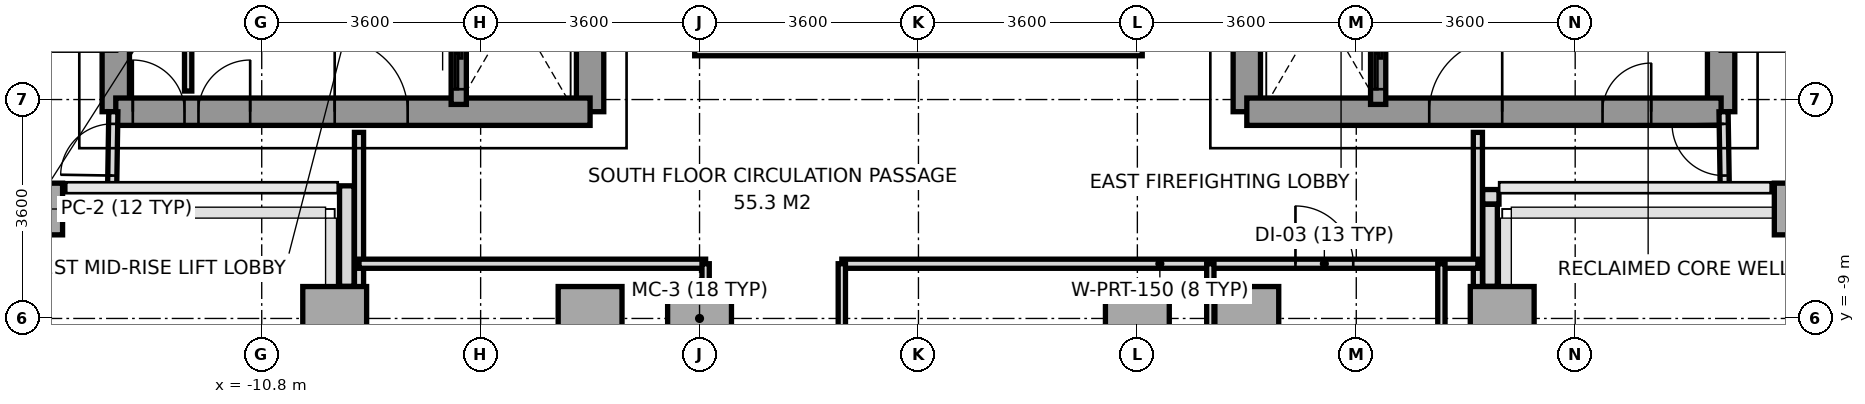
"""IFC4 building model, lengths in metres.
Left out: names, types, materials, properties, quantities, classifications, styles, units other than length and angle.
Written with IfcOpenShell. Run it as: python <this file> out.ifc"""

import sys

from ifc_helpers import new_model, si_unit, direction, frame, frame_2d, origin, origin_2d, place, context, subcontext, project, spatial, rectangle, extrude, source, transform, mapped, element, fill, save


model = new_model("IFC4")
c1 = context("Model", 3, precision=1e-05, world=origin(), true_north=direction((0.0, 1.0)))
c2 = subcontext(c1, "Body", "Model", "MODEL_VIEW")
j1 = project(units=[si_unit("LENGTHUNIT", "METRE"), si_unit("PLANEANGLEUNIT", "RADIAN")], contexts=[c1])
p1 = place(None, origin())
s1 = spatial("IfcSite", under=j1, at=p1, CompositionType="ELEMENT")
p2 = place(p1, origin())
s2 = spatial("IfcBuilding", under=s1, at=p2, CompositionType="ELEMENT")
p3 = place(p2, frame((0.0, 0.0, 121.0)))
s3 = spatial("IfcBuildingStorey", under=s2, at=p3, CompositionType="ELEMENT", Elevation=121.0)
m1 = source(origin(), c2, "Body", "SweptSolid", [
    extrude(rectangle(XDim=0.65, YDim=0.85, at=origin_2d()), origin(), (0.0, 0.0, 1.0), 3.2),
])
p4 = place(p3, frame((-14.4, -7.2, 0.0), z_axis=(0.0, 0.0, 1.0), x_axis=(1.0, 0.0, 0.0)))
e1 = element("IfcColumn", 1, at=p4, inside=s3, PredefinedType="COLUMN", context=c2, shape_type="MappedRepresentation", body=[
    mapped(m1, transform((0.0, 0.0, 0.0), x_axis=(1.0, 0.0, 0.0), y_axis=(0.0, 1.0, 0.0), z_axis=(0.0, 0.0, 1.0), scale=1.0)),
])
m2 = source(origin(), c2, "Body", "SweptSolid", [
    extrude(rectangle(XDim=1.05, YDim=1.05, at=origin_2d()), origin(), (0.0, 0.0, 1.0), 3.2),
])
for number, where, z_axis, x_axis in (
    (2, (-9.6, -9.0, 0.0), (0.0, 0.0, 1.0), (1.0, 0.0, 0.0)),
    (3, (-5.4, -9.0, 0.0), (0.0, 0.0, 1.0), (1.0, 0.0, 0.0)),
    (4, (-3.6, -9.0, 0.0), (0.0, 0.0, 1.0), (1.0, 0.0, 0.0)),
    (5, (3.6, -9.0, 0.0), (0.0, 0.0, 1.0), (1.0, 0.0, 0.0)),
    (6, (5.4, -9.0, 0.0), (0.0, 0.0, 1.0), (1.0, 0.0, 0.0)),
    (7, (9.6, -9.0, 0.0), (0.0, 0.0, 1.0), (1.0, 0.0, 0.0)),
):
    element("IfcColumn", number, at=place(p3, frame(where, z_axis=z_axis, x_axis=x_axis)), inside=s3, PredefinedType="COLUMN", context=c2, shape_type="MappedRepresentation", body=[
        mapped(m2, transform((0.0, 0.0, 0.0), x_axis=(1.0, 0.0, 0.0), y_axis=(0.0, 1.0, 0.0), z_axis=(0.0, 0.0, 1.0), scale=1.0)),
    ])
p5 = place(p3, frame((14.4, -7.2, 0.0), z_axis=(0.0, 0.0, 1.0), x_axis=(1.0, 0.0, 0.0)))
e8 = element("IfcColumn", 8, at=p5, inside=s3, PredefinedType="COLUMN", context=c2, shape_type="MappedRepresentation", body=[
    mapped(m1, transform((0.0, 0.0, 0.0), x_axis=(1.0, 0.0, 0.0), y_axis=(0.0, 1.0, 0.0), z_axis=(0.0, 0.0, 1.0), scale=1.0)),
])
p6 = place(p3, frame((9.547, -7.0, 0.0), z_axis=(0.0, 0.0, 1.0), x_axis=(-1.0, 0.0, 0.0)))
e9 = element("IfcWall", 9, at=p6, inside=s3, PredefinedType="PARAPET", context=c2, shape_type="SweptSolid", body=[
    extrude(rectangle(XDim=0.269, YDim=0.24, at=frame_2d((0.135, 0.0))), origin(), (0.0, 0.0, 1.0), 1.15),
])
p7 = place(p3, frame((9.4, -7.123, 0.0), z_axis=(0.0, 0.0, 1.0), x_axis=(0.0, -1.0, 0.0)))
e10 = element("IfcWall", 10, at=p7, inside=s3, PredefinedType="PARAPET", context=c2, shape_type="SweptSolid", body=[
    extrude(rectangle(XDim=1.349, YDim=0.24, at=frame_2d((0.674, 0.0))), origin(), (0.0, 0.0, 1.0), 1.15),
])
p8 = place(p3, frame((-9.4, -8.472, 0.0), z_axis=(0.0, 0.0, 1.0), x_axis=(0.0, 1.0, 0.0)))
e11 = element("IfcWall", 11, at=p8, inside=s3, PredefinedType="PARAPET", context=c2, shape_type="SweptSolid", body=[
    extrude(rectangle(XDim=1.653, YDim=0.24, at=frame_2d((0.827, 0.0))), origin(), (0.0, 0.0, 1.0), 1.15),
])
p9 = place(p3, frame((-13.2, -5.6, 0.0), z_axis=(0.0, 0.0, 1.0), x_axis=(0.0, 1.0, 0.0)))
e12 = element("IfcWall", 12, at=p9, inside=s3, PredefinedType="SHEAR", context=c2, shape_type="SweptSolid", body=[
    extrude(rectangle(XDim=11.2, YDim=0.45, at=frame_2d((5.6, 0.0))), origin(), (0.0, 0.0, 1.0), 3.2),
])
p10 = place(p3, frame((-5.4, -5.6, 0.0), z_axis=(0.0, 0.0, 1.0), x_axis=(0.0, 1.0, 0.0)))
e13 = element("IfcWall", 13, at=p10, inside=s3, PredefinedType="SHEAR", context=c2, shape_type="SweptSolid", body=[
    extrude(rectangle(XDim=12.5, YDim=0.45, at=frame_2d((6.25, 0.0))), origin(), (0.0, 0.0, 1.0), 3.2),
])
p11 = place(p10, frame((4.55, 0.0, 0.0)))
e14 = element("IfcOpeningElement", 14, at=p11, cuts=e13, PredefinedType="OPENING", context=c2, shape_type="SweptSolid", body=[
    extrude(rectangle(XDim=1.2, YDim=2.2, at=frame_2d((0.6, 1.1))), frame((0.0, 0.235, 0.0), z_axis=(0.0, -1.0, 0.0), x_axis=(1.0, 0.0, 0.0)), (0.0, 0.0, 1.0), 0.47),
])
p12 = place(p10, frame((6.86, 0.0, 0.0)))
e15 = element("IfcOpeningElement", 15, at=p12, cuts=e13, PredefinedType="OPENING", context=c2, shape_type="SweptSolid", body=[
    extrude(rectangle(XDim=0.8, YDim=2.1, at=frame_2d((0.4, 1.05))), frame((0.0, 0.235, 0.0), z_axis=(0.0, -1.0, 0.0), x_axis=(1.0, 0.0, 0.0)), (0.0, 0.0, 1.0), 0.47),
])
p13 = place(p3, frame((-13.2, -5.6, 0.0), z_axis=(0.0, 0.0, 1.0), x_axis=(1.0, 0.0, 0.0)))
e16 = element("IfcWall", 16, at=p13, inside=s3, PredefinedType="SHEAR", context=c2, shape_type="SweptSolid", body=[
    extrude(rectangle(XDim=7.8, YDim=0.45, at=frame_2d((3.9, 0.0))), origin(), (0.0, 0.0, 1.0), 3.2),
])
p14 = place(p13, frame((3.6, 0.0, 0.0)))
e17 = element("IfcOpeningElement", 17, at=p14, cuts=e16, PredefinedType="OPENING", context=c2, shape_type="SweptSolid", body=[
    extrude(rectangle(XDim=1.2, YDim=2.2, at=frame_2d((0.6, 1.1))), frame((0.0, 0.235, 0.0), z_axis=(0.0, -1.0, 0.0), x_axis=(1.0, 0.0, 0.0)), (0.0, 0.0, 1.0), 0.47),
])
p15 = place(p13, frame((0.28, 0.0, 0.0)))
e18 = element("IfcOpeningElement", 18, at=p15, cuts=e16, PredefinedType="OPENING", context=c2, shape_type="SweptSolid", body=[
    extrude(rectangle(XDim=0.85, YDim=2.1, at=frame_2d((0.425, 1.05))), frame((0.0, 0.235, 0.0), z_axis=(0.0, -1.0, 0.0), x_axis=(1.0, 0.0, 0.0)), (0.0, 0.0, 1.0), 0.47),
])
p16 = place(p13, frame((1.36, 0.0, 0.0)))
e19 = element("IfcOpeningElement", 19, at=p16, cuts=e16, PredefinedType="OPENING", context=c2, shape_type="SweptSolid", body=[
    extrude(rectangle(XDim=0.85, YDim=2.1, at=frame_2d((0.425, 1.05))), frame((0.0, 0.235, 0.0), z_axis=(0.0, -1.0, 0.0), x_axis=(1.0, 0.0, 0.0)), (0.0, 0.0, 1.0), 0.47),
])
p17 = place(p3, frame((13.2, -5.6, 0.0), z_axis=(0.0, 0.0, 1.0), x_axis=(0.0, 1.0, 0.0)))
e20 = element("IfcWall", 20, at=p17, inside=s3, PredefinedType="SHEAR", context=c2, shape_type="SweptSolid", body=[
    extrude(rectangle(XDim=11.2, YDim=0.45, at=frame_2d((5.6, 0.0))), origin(), (0.0, 0.0, 1.0), 3.2),
])
p18 = place(p3, frame((5.4, -5.6, 0.0), z_axis=(0.0, 0.0, 1.0), x_axis=(0.0, 1.0, 0.0)))
e21 = element("IfcWall", 21, at=p18, inside=s3, PredefinedType="SHEAR", context=c2, shape_type="SweptSolid", body=[
    extrude(rectangle(XDim=12.5, YDim=0.45, at=frame_2d((6.25, 0.0))), origin(), (0.0, 0.0, 1.0), 3.2),
])
p19 = place(p18, frame((4.55, 0.0, 0.0)))
e22 = element("IfcOpeningElement", 22, at=p19, cuts=e21, PredefinedType="OPENING", context=c2, shape_type="SweptSolid", body=[
    extrude(rectangle(XDim=1.2, YDim=2.2, at=frame_2d((0.6, 1.1))), frame((0.0, 0.235, 0.0), z_axis=(0.0, -1.0, 0.0), x_axis=(1.0, 0.0, 0.0)), (0.0, 0.0, 1.0), 0.47),
])
p20 = place(p18, frame((6.86, 0.0, 0.0)))
e23 = element("IfcOpeningElement", 23, at=p20, cuts=e21, PredefinedType="OPENING", context=c2, shape_type="SweptSolid", body=[
    extrude(rectangle(XDim=0.8, YDim=2.1, at=frame_2d((0.4, 1.05))), frame((0.0, 0.235, 0.0), z_axis=(0.0, -1.0, 0.0), x_axis=(1.0, 0.0, 0.0)), (0.0, 0.0, 1.0), 0.47),
])
p21 = place(p18, frame((7.88, 0.0, 0.0)))
e24 = element("IfcOpeningElement", 24, at=p21, cuts=e21, PredefinedType="OPENING", context=c2, shape_type="SweptSolid", body=[
    extrude(rectangle(XDim=0.8, YDim=2.1, at=frame_2d((0.4, 1.05))), frame((0.0, 0.235, 0.0), z_axis=(0.0, -1.0, 0.0), x_axis=(1.0, 0.0, 0.0)), (0.0, 0.0, 1.0), 0.47),
])
p22 = place(p3, frame((5.4, -5.6, 0.0), z_axis=(0.0, 0.0, 1.0), x_axis=(1.0, 0.0, 0.0)))
e25 = element("IfcWall", 25, at=p22, inside=s3, PredefinedType="SHEAR", context=c2, shape_type="SweptSolid", body=[
    extrude(rectangle(XDim=7.8, YDim=0.45, at=frame_2d((3.9, 0.0))), origin(), (0.0, 0.0, 1.0), 3.2),
])
p23 = place(p22, frame((3.0, 0.0, 0.0)))
e26 = element("IfcOpeningElement", 26, at=p23, cuts=e25, PredefinedType="OPENING", context=c2, shape_type="SweptSolid", body=[
    extrude(rectangle(XDim=1.2, YDim=2.2, at=frame_2d((0.6, 1.1))), frame((0.0, 0.235, 0.0), z_axis=(0.0, -1.0, 0.0), x_axis=(1.0, 0.0, 0.0)), (0.0, 0.0, 1.0), 0.47),
])
p24 = place(p22, frame((5.85, 0.0, 0.0)))
e27 = element("IfcOpeningElement", 27, at=p24, cuts=e25, PredefinedType="OPENING", context=c2, shape_type="SweptSolid", body=[
    extrude(rectangle(XDim=0.8, YDim=2.1, at=frame_2d((0.4, 1.05))), frame((0.0, 0.235, 0.0), z_axis=(0.0, -1.0, 0.0), x_axis=(1.0, 0.0, 0.0)), (0.0, 0.0, 1.0), 0.47),
])
p25 = place(p3, frame((-7.56, -5.48, 0.0), z_axis=(0.0, 0.0, 1.0), x_axis=(0.0, 1.0, 0.0)))
e28 = element("IfcWall", 28, at=p25, inside=s3, PredefinedType="SOLIDWALL", context=c2, shape_type="SweptSolid", body=[
    extrude(rectangle(XDim=1.6, YDim=0.25, at=frame_2d((0.8, 0.0))), origin(), (0.0, 0.0, 1.0), 3.2),
])
p26 = place(p25, frame((0.25, 0.0, 0.0)))
e29 = element("IfcOpeningElement", 29, at=p26, cuts=e28, PredefinedType="OPENING", context=c2, shape_type="SweptSolid", body=[
    extrude(rectangle(XDim=1.1, YDim=2.2, at=frame_2d((0.55, 1.1))), frame((0.0, 0.135, 0.0), z_axis=(0.0, -1.0, 0.0), x_axis=(1.0, 0.0, 0.0)), (0.0, 0.0, 1.0), 0.27),
])
p27 = place(p3, frame((7.56, -5.48, 0.0), z_axis=(0.0, 0.0, 1.0), x_axis=(0.0, 1.0, 0.0)))
e30 = element("IfcWall", 30, at=p27, inside=s3, PredefinedType="SOLIDWALL", context=c2, shape_type="SweptSolid", body=[
    extrude(rectangle(XDim=1.6, YDim=0.25, at=frame_2d((0.8, 0.0))), origin(), (0.0, 0.0, 1.0), 3.2),
])
p28 = place(p27, frame((0.25, 0.0, 0.0)))
e31 = element("IfcOpeningElement", 31, at=p28, cuts=e30, PredefinedType="OPENING", context=c2, shape_type="SweptSolid", body=[
    extrude(rectangle(XDim=1.1, YDim=2.2, at=frame_2d((0.55, 1.1))), frame((0.0, 0.135, 0.0), z_axis=(0.0, -1.0, 0.0), x_axis=(1.0, 0.0, 0.0)), (0.0, 0.0, 1.0), 0.27),
])
p29 = place(p3, frame((-12.01, -5.26, 0.0), z_axis=(0.0, 0.0, 1.0), x_axis=(0.0, 1.0, 0.0)))
e32 = element("IfcWall", 32, at=p29, inside=s3, PredefinedType="PARTITIONING", context=c2, shape_type="SweptSolid", body=[
    extrude(rectangle(XDim=2.94, YDim=0.12, at=frame_2d((1.47, 0.0))), origin(), (0.0, 0.0, 1.0), 3.2),
])
for number, where, z_axis, x_axis in (
    (33, (-9.2, -15.68, 0.0), (0.0, 0.0, 1.0), (0.0, 1.0, 0.0)),
    (34, (9.2, -15.68, 0.0), (0.0, 0.0, 1.0), (0.0, 1.0, 0.0)),
):
    element("IfcWall", number, at=place(p3, frame(where, z_axis=z_axis, x_axis=x_axis)), inside=s3, PredefinedType="PARTITIONING", context=c2, shape_type="SweptSolid", body=[
        extrude(rectangle(XDim=9.74, YDim=0.15, at=frame_2d((4.87, 0.0))), origin(), (0.0, 0.0, 1.0), 2.7),
    ])
p30 = place(p3, frame((-9.2, -8.1, 0.0), z_axis=(0.0, 0.0, 1.0), x_axis=(1.0, 0.0, 0.0)))
e35 = element("IfcWall", 35, at=p30, inside=s3, PredefinedType="PARTITIONING", context=c2, shape_type="SweptSolid", body=[
    extrude(rectangle(XDim=5.7, YDim=0.15, at=frame_2d((2.85, 0.0))), origin(), (0.0, 0.0, 1.0), 2.75),
])
p31 = place(p3, frame((-1.26, -8.1, 0.0), z_axis=(0.0, 0.0, 1.0), x_axis=(1.0, 0.0, 0.0)))
e36 = element("IfcWall", 36, at=p31, inside=s3, PredefinedType="PARTITIONING", context=c2, shape_type="SweptSolid", body=[
    extrude(rectangle(XDim=10.46, YDim=0.15, at=frame_2d((5.23, 0.0))), origin(), (0.0, 0.0, 1.0), 2.75),
])
p32 = place(p31, frame((7.46, 0.0, 0.0)))
e37 = element("IfcOpeningElement", 37, at=p32, cuts=e36, PredefinedType="OPENING", context=c2, shape_type="SweptSolid", body=[
    extrude(rectangle(XDim=0.95, YDim=2.15, at=frame_2d((0.475, 1.075))), frame((0.0, 0.085, 0.0), z_axis=(0.0, -1.0, 0.0), x_axis=(1.0, 0.0, 0.0)), (0.0, 0.0, 1.0), 0.17),
])
p33 = place(p3, frame((-3.5, -16.05, 0.0), z_axis=(0.0, 0.0, 1.0), x_axis=(0.0, 1.0, 0.0)))
e38 = element("IfcWall", 38, at=p33, inside=s3, PredefinedType="PARTITIONING", context=c2, shape_type="SweptSolid", body=[
    extrude(rectangle(XDim=7.95, YDim=0.12, at=frame_2d((3.975, 0.0))), origin(), (0.0, 0.0, 1.0), 2.7),
])
p34 = place(p33, frame((1.2, 0.0, 0.0)))
e39 = element("IfcOpeningElement", 39, at=p34, cuts=e38, PredefinedType="OPENING", context=c2, shape_type="SweptSolid", body=[
    extrude(rectangle(XDim=0.95, YDim=2.15, at=frame_2d((0.475, 1.075))), frame((0.0, 0.07, 0.0), z_axis=(0.0, -1.0, 0.0), x_axis=(1.0, 0.0, 0.0)), (0.0, 0.0, 1.0), 0.14),
])
p35 = place(p3, frame((-1.26, -16.05, 0.0), z_axis=(0.0, 0.0, 1.0), x_axis=(0.0, 1.0, 0.0)))
e40 = element("IfcWall", 40, at=p35, inside=s3, PredefinedType="PARTITIONING", context=c2, shape_type="SweptSolid", body=[
    extrude(rectangle(XDim=7.95, YDim=0.12, at=frame_2d((3.975, 0.0))), origin(), (0.0, 0.0, 1.0), 2.7),
])
p36 = place(p35, frame((1.95, 0.0, 0.0)))
e41 = element("IfcOpeningElement", 41, at=p36, cuts=e40, PredefinedType="OPENING", context=c2, shape_type="SweptSolid", body=[
    extrude(rectangle(XDim=0.95, YDim=2.15, at=frame_2d((0.475, 1.075))), frame((0.0, 0.07, 0.0), z_axis=(0.0, -1.0, 0.0), x_axis=(1.0, 0.0, 0.0)), (0.0, 0.0, 1.0), 0.14),
])
p37 = place(p3, frame((4.8, -11.5, 0.0), z_axis=(0.0, 0.0, 1.0), x_axis=(0.0, 1.0, 0.0)))
e42 = element("IfcWall", 42, at=p37, inside=s3, PredefinedType="PARTITIONING", context=c2, shape_type="SweptSolid", body=[
    extrude(rectangle(XDim=3.4, YDim=0.12, at=frame_2d((1.7, 0.0))), origin(), (0.0, 0.0, 1.0), 3.2),
])
p38 = place(p3, frame((8.6, -11.5, 0.0), z_axis=(0.0, 0.0, 1.0), x_axis=(0.0, 1.0, 0.0)))
e43 = element("IfcWall", 43, at=p38, inside=s3, PredefinedType="PARTITIONING", context=c2, shape_type="SweptSolid", body=[
    extrude(rectangle(XDim=3.4, YDim=0.12, at=frame_2d((1.7, 0.0))), origin(), (0.0, 0.0, 1.0), 2.7),
])
p39 = place(p3, frame((-13.26, -6.85, 0.0), z_axis=(0.0, 0.0, 1.0), x_axis=(0.016013571389, 0.999871774545, 0.0)))
e44 = element("IfcWall", 44, at=p39, inside=s3, PredefinedType="PARTITIONING", context=c2, shape_type="SweptSolid", body=[
    extrude(rectangle(XDim=1.25, YDim=0.15, at=frame_2d((0.625, 0.0))), origin(), (0.0, 0.0, 1.0), 3.2),
])
p40 = place(p39, frame((0.2, 0.0, 0.0)))
e45 = element("IfcOpeningElement", 45, at=p40, cuts=e44, PredefinedType="OPENING", context=c2, shape_type="SweptSolid", body=[
    extrude(rectangle(XDim=0.85, YDim=2.1, at=frame_2d((0.425, 1.05))), frame((0.0, 0.085, 0.0), z_axis=(0.0, -1.0, 0.0), x_axis=(1.0, 0.0, 0.0)), (0.0, 0.0, 1.0), 0.17),
])
p41 = place(p3, frame((13.26, -6.85, 0.0), z_axis=(0.0, 0.0, 1.0), x_axis=(-0.016013571389, 0.999871774545, 0.0)))
e46 = element("IfcWall", 46, at=p41, inside=s3, PredefinedType="PARTITIONING", context=c2, shape_type="SweptSolid", body=[
    extrude(rectangle(XDim=1.25, YDim=0.15, at=frame_2d((0.625, 0.0))), origin(), (0.0, 0.0, 1.0), 3.2),
])
p42 = place(p41, frame((0.2, 0.0, 0.0)))
e47 = element("IfcOpeningElement", 47, at=p42, cuts=e46, PredefinedType="OPENING", context=c2, shape_type="SweptSolid", body=[
    extrude(rectangle(XDim=0.85, YDim=2.1, at=frame_2d((0.425, 1.05))), frame((0.0, 0.085, 0.0), z_axis=(0.0, -1.0, 0.0), x_axis=(1.0, 0.0, 0.0)), (0.0, 0.0, 1.0), 0.17),
])
p43 = place(p3, frame((-3.68, -4.56, 0.0), z_axis=(0.0, 0.0, 1.0), x_axis=(1.0, 0.0, 0.0)))
e48 = element("IfcWall", 48, at=p43, inside=s3, PredefinedType="PARAPET", context=c2, shape_type="SweptSolid", body=[
    extrude(rectangle(XDim=7.36, YDim=0.24, at=frame_2d((3.68, 0.0))), origin(), (0.0, 0.0, 1.0), 1.15),
])
m3 = source(origin(), c2, "Body", "SweptSolid", [
    extrude(rectangle(XDim=1.2, YDim=2.2, at=frame_2d((0.6, 1.1))), frame((0.0, 0.025, 0.0), z_axis=(0.0, -1.0, 0.0), x_axis=(1.0, 0.0, 0.0)), (0.0, 0.0, 1.0), 0.05),
])
p44 = place(p14, origin())
e49 = element("IfcDoor", 49, at=p44, inside=s3, OperationType="SINGLE_SWING_LEFT", PredefinedType="DOOR", context=c2, shape_type="MappedRepresentation", body=[
    mapped(m3, transform((0.0, 0.0, 0.0), x_axis=(1.0, 0.0, 0.0), y_axis=(0.0, 1.0, 0.0), z_axis=(0.0, 0.0, 1.0), scale=1.0)),
])
fill(e17, e49)
p45 = place(p23, origin())
e50 = element("IfcDoor", 50, at=p45, inside=s3, OperationType="SINGLE_SWING_RIGHT", PredefinedType="DOOR", context=c2, shape_type="MappedRepresentation", body=[
    mapped(m3, transform((0.0, 0.0, 0.0), x_axis=(1.0, 0.0, 0.0), y_axis=(0.0, 1.0, 0.0), z_axis=(0.0, 0.0, 1.0), scale=1.0)),
])
fill(e26, e50)
m4 = source(origin(), c2, "Body", "SweptSolid", [
    extrude(rectangle(XDim=0.85, YDim=2.1, at=frame_2d((0.425, 1.05))), frame((0.0, 0.025, 0.0), z_axis=(0.0, -1.0, 0.0), x_axis=(1.0, 0.0, 0.0)), (0.0, 0.0, 1.0), 0.05),
])
p46 = place(p15, origin())
e51 = element("IfcDoor", 51, at=p46, inside=s3, OperationType="SINGLE_SWING_LEFT", PredefinedType="DOOR", context=c2, shape_type="MappedRepresentation", body=[
    mapped(m4, transform((0.0, 0.0, 0.0), x_axis=(1.0, 0.0, 0.0), y_axis=(0.0, 1.0, 0.0), z_axis=(0.0, 0.0, 1.0), scale=1.0)),
])
fill(e18, e51)
p47 = place(p16, origin())
e52 = element("IfcDoor", 52, at=p47, inside=s3, OperationType="SINGLE_SWING_RIGHT", PredefinedType="DOOR", context=c2, shape_type="MappedRepresentation", body=[
    mapped(m4, transform((0.0, 0.0, 0.0), x_axis=(1.0, 0.0, 0.0), y_axis=(0.0, 1.0, 0.0), z_axis=(0.0, 0.0, 1.0), scale=1.0)),
])
fill(e19, e52)
m5 = source(origin(), c2, "Body", "SweptSolid", [
    extrude(rectangle(XDim=0.8, YDim=2.1, at=frame_2d((0.4, 1.05))), frame((0.0, 0.025, 0.0), z_axis=(0.0, -1.0, 0.0), x_axis=(1.0, 0.0, 0.0)), (0.0, 0.0, 1.0), 0.05),
])
p48 = place(p24, origin())
e53 = element("IfcDoor", 53, at=p48, inside=s3, OperationType="SINGLE_SWING_RIGHT", PredefinedType="DOOR", context=c2, shape_type="MappedRepresentation", body=[
    mapped(m5, transform((0.0, 0.0, 0.0), x_axis=(1.0, 0.0, 0.0), y_axis=(0.0, 1.0, 0.0), z_axis=(0.0, 0.0, 1.0), scale=1.0)),
])
fill(e27, e53)
m6 = source(origin(), c2, "Body", "SweptSolid", [
    extrude(rectangle(XDim=1.1, YDim=2.2, at=frame_2d((0.55, 1.1))), frame((0.0, 0.025, 0.0), z_axis=(0.0, -1.0, 0.0), x_axis=(1.0, 0.0, 0.0)), (0.0, 0.0, 1.0), 0.05),
])
p49 = place(p26, origin())
e54 = element("IfcDoor", 54, at=p49, inside=s3, OperationType="SLIDING_TO_LEFT", PredefinedType="DOOR", context=c2, shape_type="MappedRepresentation", body=[
    mapped(m6, transform((0.0, 0.0, 0.0), x_axis=(1.0, 0.0, 0.0), y_axis=(0.0, 1.0, 0.0), z_axis=(0.0, 0.0, 1.0), scale=1.0)),
])
fill(e29, e54)
p50 = place(p28, origin())
e55 = element("IfcDoor", 55, at=p50, inside=s3, OperationType="SLIDING_TO_LEFT", PredefinedType="DOOR", context=c2, shape_type="MappedRepresentation", body=[
    mapped(m6, transform((0.0, 0.0, 0.0), x_axis=(1.0, 0.0, 0.0), y_axis=(0.0, 1.0, 0.0), z_axis=(0.0, 0.0, 1.0), scale=1.0)),
])
fill(e31, e55)
m7 = source(origin(), c2, "Body", "SweptSolid", [
    extrude(rectangle(XDim=0.95, YDim=2.15, at=frame_2d((0.475, 1.075))), frame((0.0, 0.025, 0.0), z_axis=(0.0, -1.0, 0.0), x_axis=(1.0, 0.0, 0.0)), (0.0, 0.0, 1.0), 0.05),
])
p51 = place(p32, origin())
e56 = element("IfcDoor", 56, at=p51, inside=s3, OperationType="SINGLE_SWING_LEFT", PredefinedType="DOOR", context=c2, shape_type="MappedRepresentation", body=[
    mapped(m7, transform((0.0, 0.0, 0.0), x_axis=(1.0, 0.0, 0.0), y_axis=(0.0, 1.0, 0.0), z_axis=(0.0, 0.0, 1.0), scale=1.0)),
])
fill(e37, e56)
p52 = place(p40, origin())
e57 = element("IfcDoor", 57, at=p52, inside=s3, OperationType="SINGLE_SWING_LEFT", PredefinedType="DOOR", context=c2, shape_type="MappedRepresentation", body=[
    mapped(m4, transform((0.0, 0.0, 0.0), x_axis=(1.0, 0.0, 0.0), y_axis=(0.0, 1.0, 0.0), z_axis=(0.0, 0.0, 1.0), scale=1.0)),
])
fill(e45, e57)
p53 = place(p42, origin())
e58 = element("IfcDoor", 58, at=p53, inside=s3, OperationType="SINGLE_SWING_RIGHT", PredefinedType="DOOR", context=c2, shape_type="MappedRepresentation", body=[
    mapped(m4, transform((0.0, 0.0, 0.0), x_axis=(1.0, 0.0, 0.0), y_axis=(0.0, 1.0, 0.0), z_axis=(0.0, 0.0, 1.0), scale=1.0)),
])
fill(e47, e58)
save(model, sys.argv[1])
